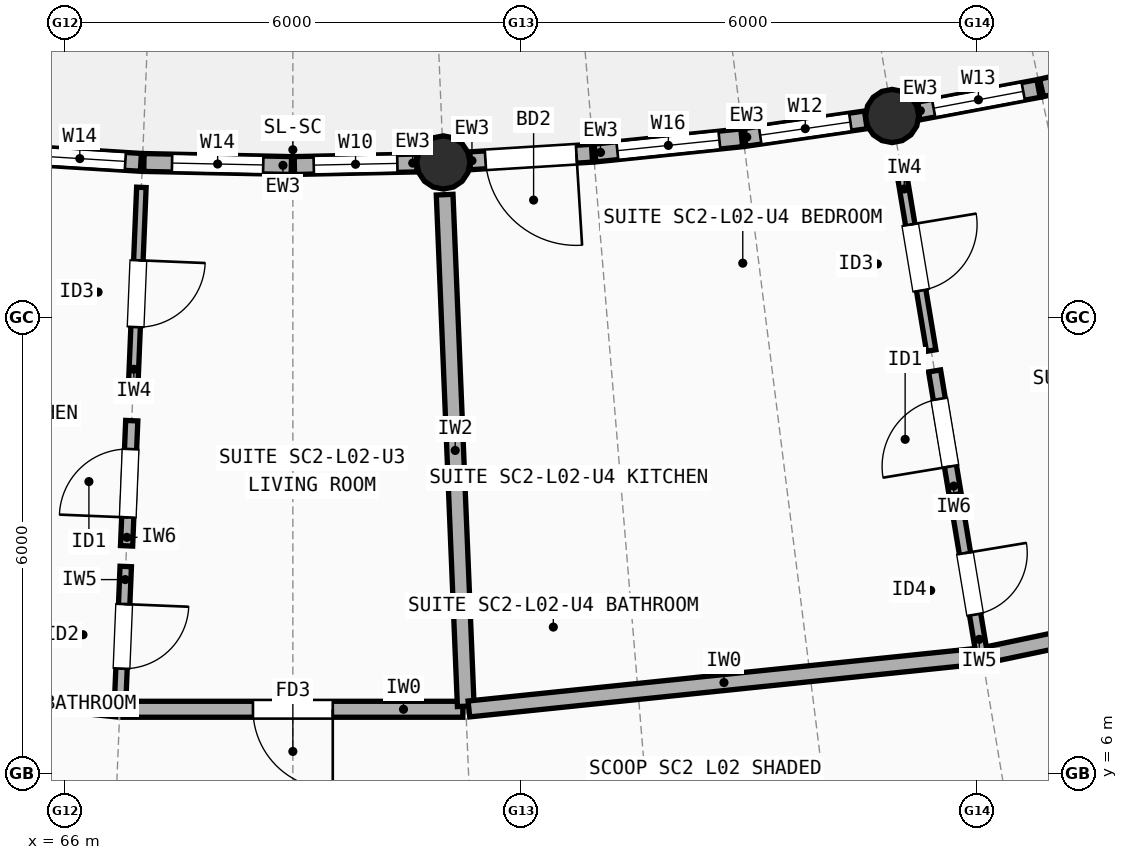
"""IFC4 building model, lengths in metres.
Left out: names, types, materials, properties, quantities, classifications, styles, units other than length and angle.
Written with IfcOpenShell. Run it as: python <this file> out.ifc"""

import sys

from ifc_helpers import new_model, si_unit, direction, frame, frame_2d, origin, origin_2d, place, context, subcontext, project, spatial, rectangle, circle, extrude, element, fill, save


model = new_model("IFC4")
c1 = context("Model", 3, precision=1e-05, world=origin(), true_north=direction((0.0, 1.0)))
c2 = subcontext(c1, "Body", "Model", "MODEL_VIEW")
j1 = project(units=[si_unit("LENGTHUNIT", "METRE"), si_unit("PLANEANGLEUNIT", "RADIAN")], contexts=[c1])
p1 = place(None, origin())
s1 = spatial("IfcSite", under=j1, at=p1, CompositionType="ELEMENT")
p2 = place(p1, origin())
s2 = spatial("IfcBuilding", under=s1, at=p2, CompositionType="ELEMENT")
p3 = place(p2, frame((0.0, 0.0, 7.7)))
s3 = spatial("IfcBuildingStorey", under=s2, at=p3, CompositionType="ELEMENT", Elevation=7.7)
for number, where, z_axis, x_axis in (
    (1, (70.979, 14.041, 0.0), (0.0, 0.0, 1.0), (1.0, 0.0, 0.0)),
    (2, (76.885, 14.652, 0.0), (0.0, 0.0, 1.0), (1.0, 0.0, 0.0)),
):
    element("IfcColumn", number, at=place(p3, frame(where, z_axis=z_axis, x_axis=x_axis)), inside=s3, PredefinedType="COLUMN", context=c2, shape_type="SweptSolid", body=[
        extrude(circle(Radius=0.35, at=origin_2d()), origin(), (0.0, 0.0, 1.0), 2.948),
    ])
p4 = place(p3, frame((65.394, 14.142, 0.0), z_axis=(0.0, 0.0, 1.0), x_axis=(0.998084310064, -0.061868489594, 0.0)))
e3 = element("IfcWall", 3, at=p4, inside=s3, PredefinedType="STANDARD", context=c2, shape_type="SweptSolid", body=[
    extrude(rectangle(XDim=1.61, YDim=0.235, at=frame_2d((0.805, 0.0))), origin(), (0.0, 0.0, 1.0), 2.684),
])
p5 = place(p4, frame((0.205, 0.0, 0.85)))
e4 = element("IfcOpeningElement", 4, at=p5, cuts=e3, PredefinedType="OPENING", context=c2, shape_type="SweptSolid", body=[
    extrude(rectangle(XDim=1.2, YDim=1.5, at=frame_2d((0.6, 0.75))), frame((0.0, 0.127, 0.0), z_axis=(0.0, -1.0, 0.0), x_axis=(1.0, 0.0, 0.0)), (0.0, 0.0, 1.0), 0.255),
])
p6 = place(p3, frame((67.04, 14.04, 0.0), z_axis=(0.0, 0.0, 1.0), x_axis=(0.999789612304, -0.020511731505, 0.0)))
e5 = element("IfcWall", 5, at=p6, inside=s3, PredefinedType="STANDARD", context=c2, shape_type="SweptSolid", body=[
    extrude(rectangle(XDim=1.94, YDim=0.235, at=frame_2d((0.97, 0.0))), origin(), (0.0, 0.0, 1.0), 2.684),
])
p7 = place(p6, frame((0.37, 0.0, 0.85)))
e6 = element("IfcOpeningElement", 6, at=p7, cuts=e5, PredefinedType="OPENING", context=c2, shape_type="SweptSolid", body=[
    extrude(rectangle(XDim=1.2, YDim=1.5, at=frame_2d((0.6, 0.75))), frame((0.0, 0.127, 0.0), z_axis=(0.0, -1.0, 0.0), x_axis=(1.0, 0.0, 0.0)), (0.0, 0.0, 1.0), 0.255),
])
p8 = place(p3, frame((69.02, 14.0, 0.0), z_axis=(0.0, 0.0, 1.0), x_axis=(0.999787311946, 0.020623551407, 0.0)))
e7 = element("IfcWall", 7, at=p8, inside=s3, PredefinedType="STANDARD", context=c2, shape_type="SweptSolid", body=[
    extrude(rectangle(XDim=1.61, YDim=0.235, at=frame_2d((0.805, 0.0))), origin(), (0.0, 0.0, 1.0), 2.684),
])
p9 = place(p8, frame((0.255, 0.0, 0.85)))
e8 = element("IfcOpeningElement", 8, at=p9, cuts=e7, PredefinedType="OPENING", context=c2, shape_type="SweptSolid", body=[
    extrude(rectangle(XDim=1.1, YDim=1.45, at=frame_2d((0.55, 0.725))), frame((0.0, 0.127, 0.0), z_axis=(0.0, -1.0, 0.0), x_axis=(1.0, 0.0, 0.0)), (0.0, 0.0, 1.0), 0.255),
])
p10 = place(p3, frame((71.329, 14.062, 0.0), z_axis=(0.0, 0.0, 1.0), x_axis=(0.998084310064, 0.061868489594, 0.0)))
e9 = element("IfcWall", 9, at=p10, inside=s3, PredefinedType="STANDARD", context=c2, shape_type="SweptSolid", body=[
    extrude(rectangle(XDim=1.61, YDim=0.235, at=frame_2d((0.805, 0.0))), origin(), (0.0, 0.0, 1.0), 2.684),
])
p11 = place(p10, frame((0.205, 0.0, 0.0)))
e10 = element("IfcOpeningElement", 10, at=p11, cuts=e9, PredefinedType="OPENING", context=c2, shape_type="SweptSolid", body=[
    extrude(rectangle(XDim=1.2, YDim=2.15, at=frame_2d((0.6, 1.075))), frame((0.0, 0.127, 0.0), z_axis=(0.0, -1.0, 0.0), x_axis=(1.0, 0.0, 0.0)), (0.0, 0.0, 1.0), 0.255),
])
p12 = place(p3, frame((72.976, 14.165, 0.0), z_axis=(0.0, 0.0, 1.0), x_axis=(0.994688684624, 0.10292920228, 0.0)))
e11 = element("IfcWall", 11, at=p12, inside=s3, PredefinedType="STANDARD", context=c2, shape_type="SweptSolid", body=[
    extrude(rectangle(XDim=1.94, YDim=0.235, at=frame_2d((0.97, 0.0))), origin(), (0.0, 0.0, 1.0), 2.684),
])
p13 = place(p12, frame((0.295, 0.0, 0.85)))
e12 = element("IfcOpeningElement", 12, at=p13, cuts=e11, PredefinedType="OPENING", context=c2, shape_type="SweptSolid", body=[
    extrude(rectangle(XDim=1.35, YDim=1.5, at=frame_2d((0.675, 0.75))), frame((0.0, 0.127, 0.0), z_axis=(0.0, -1.0, 0.0), x_axis=(1.0, 0.0, 0.0)), (0.0, 0.0, 1.0), 0.255),
])
p14 = place(p3, frame((74.945, 14.37, 0.0), z_axis=(0.0, 0.0, 1.0), x_axis=(0.98961312767, 0.143756243492, 0.0)))
e13 = element("IfcWall", 13, at=p14, inside=s3, PredefinedType="STANDARD", context=c2, shape_type="SweptSolid", body=[
    extrude(rectangle(XDim=1.61, YDim=0.235, at=frame_2d((0.805, 0.0))), origin(), (0.0, 0.0, 1.0), 2.684),
])
p15 = place(p14, frame((0.205, 0.0, 0.85)))
e14 = element("IfcOpeningElement", 14, at=p15, cuts=e13, PredefinedType="OPENING", context=c2, shape_type="SweptSolid", body=[
    extrude(rectangle(XDim=1.2, YDim=1.35, at=frame_2d((0.6, 0.675))), frame((0.0, 0.127, 0.0), z_axis=(0.0, -1.0, 0.0), x_axis=(1.0, 0.0, 0.0)), (0.0, 0.0, 1.0), 0.255),
])
p16 = place(p3, frame((77.229, 14.717, 0.0), z_axis=(0.0, 0.0, 1.0), x_axis=(0.982794848755, 0.184700528589, 0.0)))
e15 = element("IfcWall", 15, at=p16, inside=s3, PredefinedType="STANDARD", context=c2, shape_type="SweptSolid", body=[
    extrude(rectangle(XDim=1.61, YDim=0.235, at=frame_2d((0.805, 0.0))), origin(), (0.0, 0.0, 1.0), 2.684),
])
p17 = place(p16, frame((0.205, 0.0, 0.85)))
e16 = element("IfcOpeningElement", 16, at=p17, cuts=e15, PredefinedType="OPENING", context=c2, shape_type="SweptSolid", body=[
    extrude(rectangle(XDim=1.2, YDim=1.45, at=frame_2d((0.6, 0.725))), frame((0.0, 0.127, 0.0), z_axis=(0.0, -1.0, 0.0), x_axis=(1.0, 0.0, 0.0)), (0.0, 0.0, 1.0), 0.255),
])
p18 = place(p3, frame((78.85, 15.022, 0.0), z_axis=(0.0, 0.0, 1.0), x_axis=(0.974359373104, 0.224997360081, 0.0)))
e17 = element("IfcWall", 17, at=p18, inside=s3, PredefinedType="STANDARD", context=c2, shape_type="SweptSolid", body=[
    extrude(rectangle(XDim=1.94, YDim=0.235, at=frame_2d((0.97, 0.0))), origin(), (0.0, 0.0, 1.0), 2.684),
])
p19 = place(p18, frame((0.495, 0.0, 0.0)))
e18 = element("IfcOpeningElement", 18, at=p19, cuts=e17, PredefinedType="OPENING", context=c2, shape_type="SweptSolid", body=[
    extrude(rectangle(XDim=0.95, YDim=2.12, at=frame_2d((0.475, 1.06))), frame((0.0, 0.127, 0.0), z_axis=(0.0, -1.0, 0.0), x_axis=(1.0, 0.0, 0.0)), (0.0, 0.0, 1.0), 0.255),
])
p20 = place(p3, frame((59.972, 7.546, 0.0), z_axis=(0.0, 0.0, 1.0), x_axis=(0.994686939686, -0.10294606364, 0.0)))
e19 = element("IfcWall", 19, at=p20, inside=s3, PredefinedType="SOLIDWALL", context=c2, shape_type="SweptSolid", body=[
    extrude(rectangle(XDim=6.747, YDim=0.21, at=frame_2d((3.374, 0.0))), origin(), (0.0, 0.0, 1.0), 2.722),
])
p21 = place(p3, frame((66.763, 6.847, 0.0), z_axis=(0.0, 0.0, 1.0), x_axis=(1.0, 0.0, 0.0)))
e20 = element("IfcWall", 20, at=p21, inside=s3, PredefinedType="SOLIDWALL", context=c2, shape_type="SweptSolid", body=[
    extrude(rectangle(XDim=4.473, YDim=0.21, at=frame_2d((2.237, 0.0))), origin(), (0.0, 0.0, 1.0), 2.722),
])
p22 = place(p21, frame((1.711, 0.0, 0.0)))
e21 = element("IfcOpeningElement", 21, at=p22, cuts=e20, PredefinedType="OPENING", context=c2, shape_type="SweptSolid", body=[
    extrude(rectangle(XDim=1.05, YDim=2.15, at=frame_2d((0.525, 1.075))), frame((0.0, 0.115, 0.0), z_axis=(0.0, -1.0, 0.0), x_axis=(1.0, 0.0, 0.0)), (0.0, 0.0, 1.0), 0.23),
])
p23 = place(p3, frame((67.007, 13.713, 0.0), z_axis=(0.0, 0.0, 1.0), x_axis=(-0.041246071378, -0.999149018713, 0.0)))
e22 = element("IfcWall", 22, at=p23, inside=s3, PredefinedType="PARTITIONING", context=c2, shape_type="SweptSolid", body=[
    extrude(rectangle(XDim=2.8, YDim=0.125, at=frame_2d((1.4, 0.0))), origin(), (0.0, 0.0, 1.0), 2.762),
])
p24 = place(p23, frame((0.96, 0.0, 0.0)))
e23 = element("IfcOpeningElement", 23, at=p24, cuts=e22, PredefinedType="OPENING", context=c2, shape_type="SweptSolid", body=[
    extrude(rectangle(XDim=0.88, YDim=2.1, at=frame_2d((0.44, 1.05))), frame((0.0, 0.073, 0.0), z_axis=(0.0, -1.0, 0.0), x_axis=(1.0, 0.0, 0.0)), (0.0, 0.0, 1.0), 0.145),
])
p25 = place(p3, frame((66.88, 10.644, 0.0), z_axis=(0.0, 0.0, 1.0), x_axis=(-0.04118075259, -0.999151713013, 0.0)))
e24 = element("IfcWall", 24, at=p25, inside=s3, PredefinedType="PLUMBINGWALL", context=c2, shape_type="SweptSolid", body=[
    extrude(rectangle(XDim=1.648, YDim=0.16, at=frame_2d((0.824, 0.0))), origin(), (0.0, 0.0, 1.0), 2.762),
])
p26 = place(p25, frame((0.374, 0.0, 0.0)))
e25 = element("IfcOpeningElement", 25, at=p26, cuts=e24, PredefinedType="OPENING", context=c2, shape_type="SweptSolid", body=[
    extrude(rectangle(XDim=0.9, YDim=2.1, at=frame_2d((0.45, 1.05))), frame((0.0, 0.09, 0.0), z_axis=(0.0, -1.0, 0.0), x_axis=(1.0, 0.0, 0.0)), (0.0, 0.0, 1.0), 0.18),
])
p27 = place(p3, frame((66.801, 8.725, 0.0), z_axis=(0.0, 0.0, 1.0), x_axis=(-0.04126627959, -0.999148184289, 0.0)))
e26 = element("IfcWall", 26, at=p27, inside=s3, PredefinedType="PARTITIONING", context=c2, shape_type="SweptSolid", body=[
    extrude(rectangle(XDim=1.84, YDim=0.15, at=frame_2d((0.92, 0.0))), origin(), (0.0, 0.0, 1.0), 2.762),
])
p28 = place(p27, frame((0.495, 0.0, 0.0)))
e27 = element("IfcOpeningElement", 27, at=p28, cuts=e26, PredefinedType="OPENING", context=c2, shape_type="SweptSolid", body=[
    extrude(rectangle(XDim=0.85, YDim=2.1, at=frame_2d((0.425, 1.05))), frame((0.0, 0.085, 0.0), z_axis=(0.0, -1.0, 0.0), x_axis=(1.0, 0.0, 0.0)), (0.0, 0.0, 1.0), 0.17),
])
p29 = place(p3, frame((70.997, 13.617, 0.0), z_axis=(0.0, 0.0, 1.0), x_axis=(0.04124611243, -0.999149017019, 0.0)))
e28 = element("IfcWall", 28, at=p29, inside=s3, PredefinedType="SOLIDWALL", context=c2, shape_type="SweptSolid", body=[
    extrude(rectangle(XDim=6.736, YDim=0.22, at=frame_2d((3.368, 0.0))), origin(), (0.0, 0.0, 1.0), 2.742),
])
p30 = place(p3, frame((71.316, 6.851, 0.0), z_axis=(0.0, 0.0, 1.0), x_axis=(0.994686939686, 0.10294606364, 0.0)))
e29 = element("IfcWall", 29, at=p30, inside=s3, PredefinedType="SOLIDWALL", context=c2, shape_type="SweptSolid", body=[
    extrude(rectangle(XDim=6.747, YDim=0.21, at=frame_2d((3.374, 0.0))), origin(), (0.0, 0.0, 1.0), 2.722),
])
p31 = place(p3, frame((78.107, 7.558, 0.0), z_axis=(0.0, 0.0, 1.0), x_axis=(0.978806148413, 0.204788973894, 0.0)))
e30 = element("IfcWall", 30, at=p31, inside=s3, PredefinedType="SOLIDWALL", context=c2, shape_type="SweptSolid", body=[
    extrude(rectangle(XDim=4.473, YDim=0.21, at=frame_2d((2.236, 0.0))), origin(), (0.0, 0.0, 1.0), 2.762),
])
p32 = place(p31, frame((1.737, 0.0, 0.0)))
e31 = element("IfcOpeningElement", 31, at=p32, cuts=e30, PredefinedType="OPENING", context=c2, shape_type="SweptSolid", body=[
    extrude(rectangle(XDim=1.0, YDim=2.15, at=frame_2d((0.5, 1.075))), frame((0.0, 0.115, 0.0), z_axis=(0.0, -1.0, 0.0), x_axis=(1.0, 0.0, 0.0)), (0.0, 0.0, 1.0), 0.23),
])
p33 = place(p3, frame((76.991, 14.013, 0.0), z_axis=(0.0, 0.0, 1.0), x_axis=(0.16420741421, -0.986425833562, 0.0)))
e32 = element("IfcWall", 32, at=p33, inside=s3, PredefinedType="PARTITIONING", context=c2, shape_type="SweptSolid", body=[
    extrude(rectangle(XDim=2.48, YDim=0.125, at=frame_2d((1.24, 0.0))), origin(), (0.0, 0.0, 1.0), 2.742),
])
p34 = place(p33, frame((0.8, 0.0, 0.0)))
e33 = element("IfcOpeningElement", 33, at=p34, cuts=e32, PredefinedType="OPENING", context=c2, shape_type="SweptSolid", body=[
    extrude(rectangle(XDim=0.88, YDim=2.1, at=frame_2d((0.44, 1.05))), frame((0.0, 0.073, 0.0), z_axis=(0.0, -1.0, 0.0), x_axis=(1.0, 0.0, 0.0)), (0.0, 0.0, 1.0), 0.145),
])
p35 = place(p3, frame((77.443, 11.298, 0.0), z_axis=(0.0, 0.0, 1.0), x_axis=(0.164158726706, -0.986433937193, 0.0)))
e34 = element("IfcWall", 34, at=p35, inside=s3, PredefinedType="PLUMBINGWALL", context=c2, shape_type="SweptSolid", body=[
    extrude(rectangle(XDim=1.648, YDim=0.16, at=frame_2d((0.824, 0.0))), origin(), (0.0, 0.0, 1.0), 2.742),
])
p36 = place(p35, frame((0.374, 0.0, 0.0)))
e35 = element("IfcOpeningElement", 35, at=p36, cuts=e34, PredefinedType="OPENING", context=c2, shape_type="SweptSolid", body=[
    extrude(rectangle(XDim=0.9, YDim=2.1, at=frame_2d((0.45, 1.05))), frame((0.0, 0.09, 0.0), z_axis=(0.0, -1.0, 0.0), x_axis=(1.0, 0.0, 0.0)), (0.0, 0.0, 1.0), 0.18),
])
p37 = place(p3, frame((77.759, 9.404, 0.0), z_axis=(0.0, 0.0, 1.0), x_axis=(0.164269882379, -0.986415432636, 0.0)))
e36 = element("IfcWall", 36, at=p37, inside=s3, PredefinedType="PARTITIONING", context=c2, shape_type="SweptSolid", body=[
    extrude(rectangle(XDim=1.84, YDim=0.15, at=frame_2d((0.92, 0.0))), origin(), (0.0, 0.0, 1.0), 2.742),
])
p38 = place(p37, frame((0.51, 0.0, 0.0)))
e37 = element("IfcOpeningElement", 37, at=p38, cuts=e36, PredefinedType="OPENING", context=c2, shape_type="SweptSolid", body=[
    extrude(rectangle(XDim=0.82, YDim=2.08, at=frame_2d((0.41, 1.04))), frame((0.0, 0.085, 0.0), z_axis=(0.0, -1.0, 0.0), x_axis=(1.0, 0.0, 0.0)), (0.0, 0.0, 1.0), 0.17),
])
p39 = place(p5, origin())
e38 = element("IfcWindow", 38, at=p39, inside=s3, PartitioningType="SINGLE_PANEL", PredefinedType="WINDOW", context=c2, shape_type="SweptSolid", body=[
    extrude(rectangle(XDim=1.2, YDim=1.5, at=frame_2d((0.6, 0.75))), frame((0.0, 0.03, 0.0), z_axis=(0.0, -1.0, 0.0), x_axis=(1.0, 0.0, 0.0)), (0.0, 0.0, 1.0), 0.06),
])
fill(e4, e38)
p40 = place(p7, origin())
e39 = element("IfcWindow", 39, at=p40, inside=s3, PartitioningType="SINGLE_PANEL", PredefinedType="WINDOW", context=c2, shape_type="SweptSolid", body=[
    extrude(rectangle(XDim=1.2, YDim=1.5, at=frame_2d((0.6, 0.75))), frame((0.0, 0.03, 0.0), z_axis=(0.0, -1.0, 0.0), x_axis=(1.0, 0.0, 0.0)), (0.0, 0.0, 1.0), 0.06),
])
fill(e6, e39)
p41 = place(p9, origin())
e40 = element("IfcWindow", 40, at=p41, inside=s3, PartitioningType="SINGLE_PANEL", PredefinedType="WINDOW", context=c2, shape_type="SweptSolid", body=[
    extrude(rectangle(XDim=1.1, YDim=1.45, at=frame_2d((0.55, 0.725))), frame((0.0, 0.03, 0.0), z_axis=(0.0, -1.0, 0.0), x_axis=(1.0, 0.0, 0.0)), (0.0, 0.0, 1.0), 0.06),
])
fill(e8, e40)
p42 = place(p11, origin())
e41 = element("IfcDoor", 41, at=p42, inside=s3, OperationType="SINGLE_SWING_RIGHT", PredefinedType="DOOR", context=c2, shape_type="SweptSolid", body=[
    extrude(rectangle(XDim=1.2, YDim=2.15, at=frame_2d((0.6, 1.075))), frame((0.0, 0.025, 0.0), z_axis=(0.0, -1.0, 0.0), x_axis=(1.0, 0.0, 0.0)), (0.0, 0.0, 1.0), 0.05),
])
fill(e10, e41)
p43 = place(p13, origin())
e42 = element("IfcWindow", 42, at=p43, inside=s3, PartitioningType="SINGLE_PANEL", PredefinedType="WINDOW", context=c2, shape_type="SweptSolid", body=[
    extrude(rectangle(XDim=1.35, YDim=1.5, at=frame_2d((0.675, 0.75))), frame((0.0, 0.03, 0.0), z_axis=(0.0, -1.0, 0.0), x_axis=(1.0, 0.0, 0.0)), (0.0, 0.0, 1.0), 0.06),
])
fill(e12, e42)
p44 = place(p15, origin())
e43 = element("IfcWindow", 43, at=p44, inside=s3, PartitioningType="SINGLE_PANEL", PredefinedType="WINDOW", context=c2, shape_type="SweptSolid", body=[
    extrude(rectangle(XDim=1.2, YDim=1.35, at=frame_2d((0.6, 0.675))), frame((0.0, 0.03, 0.0), z_axis=(0.0, -1.0, 0.0), x_axis=(1.0, 0.0, 0.0)), (0.0, 0.0, 1.0), 0.06),
])
fill(e14, e43)
p45 = place(p17, origin())
e44 = element("IfcWindow", 44, at=p45, inside=s3, PartitioningType="SINGLE_PANEL", PredefinedType="WINDOW", context=c2, shape_type="SweptSolid", body=[
    extrude(rectangle(XDim=1.2, YDim=1.45, at=frame_2d((0.6, 0.725))), frame((0.0, 0.03, 0.0), z_axis=(0.0, -1.0, 0.0), x_axis=(1.0, 0.0, 0.0)), (0.0, 0.0, 1.0), 0.06),
])
fill(e16, e44)
p46 = place(p22, origin())
e45 = element("IfcDoor", 45, at=p46, inside=s3, OperationType="SINGLE_SWING_RIGHT", PredefinedType="DOOR", context=c2, shape_type="SweptSolid", body=[
    extrude(rectangle(XDim=1.05, YDim=2.15, at=frame_2d((0.525, 1.075))), frame((0.0, 0.025, 0.0), z_axis=(0.0, -1.0, 0.0), x_axis=(1.0, 0.0, 0.0)), (0.0, 0.0, 1.0), 0.05),
])
fill(e21, e45)
p47 = place(p24, origin())
e46 = element("IfcDoor", 46, at=p47, inside=s3, OperationType="SINGLE_SWING_LEFT", PredefinedType="DOOR", context=c2, shape_type="SweptSolid", body=[
    extrude(rectangle(XDim=0.88, YDim=2.1, at=frame_2d((0.44, 1.05))), frame((0.0, 0.025, 0.0), z_axis=(0.0, -1.0, 0.0), x_axis=(1.0, 0.0, 0.0)), (0.0, 0.0, 1.0), 0.05),
])
fill(e23, e46)
p48 = place(p26, origin())
e47 = element("IfcDoor", 47, at=p48, inside=s3, OperationType="SINGLE_SWING_RIGHT", PredefinedType="DOOR", context=c2, shape_type="SweptSolid", body=[
    extrude(rectangle(XDim=0.9, YDim=2.1, at=frame_2d((0.45, 1.05))), frame((0.0, 0.025, 0.0), z_axis=(0.0, -1.0, 0.0), x_axis=(1.0, 0.0, 0.0)), (0.0, 0.0, 1.0), 0.05),
])
fill(e25, e47)
p49 = place(p28, origin())
e48 = element("IfcDoor", 48, at=p49, inside=s3, OperationType="SINGLE_SWING_LEFT", PredefinedType="DOOR", context=c2, shape_type="SweptSolid", body=[
    extrude(rectangle(XDim=0.85, YDim=2.1, at=frame_2d((0.425, 1.05))), frame((0.0, 0.025, 0.0), z_axis=(0.0, -1.0, 0.0), x_axis=(1.0, 0.0, 0.0)), (0.0, 0.0, 1.0), 0.05),
])
fill(e27, e48)
p50 = place(p34, origin())
e49 = element("IfcDoor", 49, at=p50, inside=s3, OperationType="SINGLE_SWING_LEFT", PredefinedType="DOOR", context=c2, shape_type="SweptSolid", body=[
    extrude(rectangle(XDim=0.88, YDim=2.1, at=frame_2d((0.44, 1.05))), frame((0.0, 0.025, 0.0), z_axis=(0.0, -1.0, 0.0), x_axis=(1.0, 0.0, 0.0)), (0.0, 0.0, 1.0), 0.05),
])
fill(e33, e49)
p51 = place(p36, origin())
e50 = element("IfcDoor", 50, at=p51, inside=s3, OperationType="SINGLE_SWING_RIGHT", PredefinedType="DOOR", context=c2, shape_type="SweptSolid", body=[
    extrude(rectangle(XDim=0.9, YDim=2.1, at=frame_2d((0.45, 1.05))), frame((0.0, 0.025, 0.0), z_axis=(0.0, -1.0, 0.0), x_axis=(1.0, 0.0, 0.0)), (0.0, 0.0, 1.0), 0.05),
])
fill(e35, e50)
p52 = place(p38, origin())
e51 = element("IfcDoor", 51, at=p52, inside=s3, OperationType="SINGLE_SWING_LEFT", PredefinedType="DOOR", context=c2, shape_type="SweptSolid", body=[
    extrude(rectangle(XDim=0.82, YDim=2.08, at=frame_2d((0.41, 1.04))), frame((0.0, 0.025, 0.0), z_axis=(0.0, -1.0, 0.0), x_axis=(1.0, 0.0, 0.0)), (0.0, 0.0, 1.0), 0.05),
])
fill(e37, e51)
save(model, sys.argv[1])
